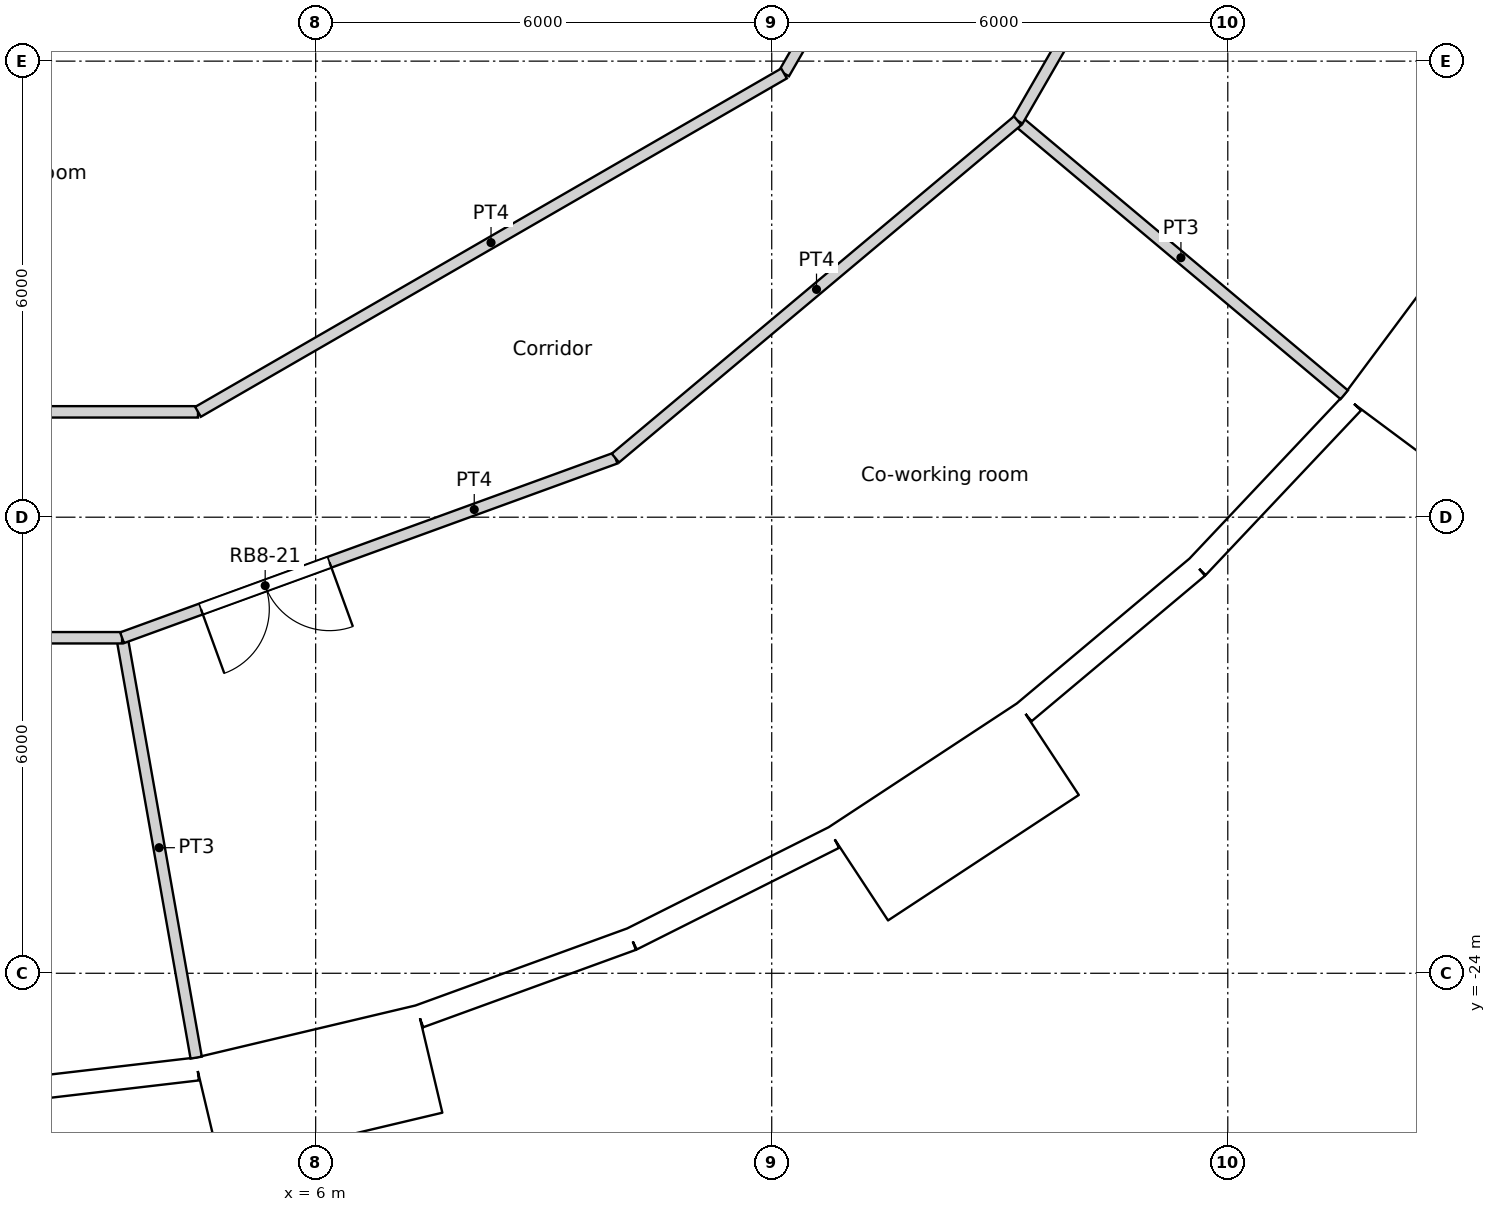
"""IFC4 building model, lengths in metres.
Left out: names, types, materials, properties, quantities, classifications, styles, units other than length and angle.
Written with IfcOpenShell. Run it as: python <this file> out.ifc"""

import sys

from ifc_helpers import new_model, si_unit, direction, frame, frame_2d, origin, origin_2d, place, context, subcontext, project, spatial, rectangle, circle, extrude, element, fill, save


model = new_model("IFC4")
c1 = context("Model", 3, precision=1e-05, world=origin(), true_north=direction((0.0, 1.0)))
c2 = subcontext(c1, "Body", "Model", "MODEL_VIEW")
j1 = project(units=[si_unit("LENGTHUNIT", "METRE"), si_unit("PLANEANGLEUNIT", "RADIAN")], contexts=[c1])
p1 = place(None, origin())
s1 = spatial("IfcSite", under=j1, at=p1, CompositionType="ELEMENT")
p2 = place(p1, origin())
s2 = spatial("IfcBuilding", under=s1, at=p2, CompositionType="ELEMENT")
p3 = place(p2, frame((0.0, 0.0, 201.6)))
s3 = spatial("IfcBuildingStorey", under=s2, at=p3, CompositionType="ELEMENT", Elevation=201.6)
for number, where, z_axis, x_axis in (
    (1, (4.263, -24.175, 0.0), (0.0, 0.0, 1.0), (1.0, 0.0, 0.0)),
    (2, (9.723, -22.54, 0.0), (0.0, 0.0, 1.0), (1.0, 0.0, 0.0)),
    (3, (14.659, -19.69, 0.0), (0.0, 0.0, 1.0), (1.0, 0.0, 0.0)),
    (4, (18.805, -15.779, 0.0), (0.0, 0.0, 1.0), (1.0, 0.0, 0.0)),
):
    element("IfcColumn", number, at=place(p3, frame(where, z_axis=z_axis, x_axis=x_axis)), inside=s3, PredefinedType="COLUMN", context=c2, shape_type="SweptSolid", body=[
        extrude(circle(Radius=0.6, at=origin_2d()), origin(), (0.0, 0.0, 1.0), 3.6),
    ])
for number, where, z_axis, x_axis in (
    (5, (6.876, -17.521, 0.0), (0.0, 0.0, 1.0), (1.0, 0.0, 0.0)),
    (6, (11.735, -14.716, 0.0), (0.0, 0.0, 1.0), (1.0, 0.0, 0.0)),
):
    element("IfcColumn", number, at=place(p3, frame(where, z_axis=z_axis, x_axis=x_axis)), inside=s3, PredefinedType="COLUMN", context=c2, shape_type="SweptSolid", body=[
        extrude(circle(Radius=0.65, at=origin_2d()), origin(), (0.0, 0.0, 1.0), 3.6),
    ])
p4 = place(p3, frame((1.491, -25.604, 0.0), z_axis=(0.0, 0.0, 1.0), x_axis=(0.993245010522, 0.1160359818, 0.0)))
e7 = element("IfcWall", 7, at=p4, inside=s3, PredefinedType="SOLIDWALL", context=c2, shape_type="SweptSolid", body=[
    extrude(rectangle(XDim=2.973, YDim=0.3, at=frame_2d((1.486, 0.0))), origin(), (0.0, 0.0, 1.0), 3.3),
])
p5 = place(p4, frame((1.486, 0.0, 1.55)))
e8 = element("IfcOpeningElement", 8, at=p5, cuts=e7, PredefinedType="OPENING", context=c2, shape_type="SweptSolid", body=[
    extrude(circle(Radius=0.9, at=origin_2d()), frame((0.0, 0.16, 0.0), z_axis=(0.0, -1.0, 0.0), x_axis=(1.0, 0.0, 0.0)), (0.0, 0.0, 1.0), 0.32),
])
p6 = place(p3, frame((4.578, -25.819, -0.3), z_axis=(0.0, 0.0, 1.0), x_axis=(0.973042333261, 0.23062657627, 0.0)))
e9 = element("IfcWall", 9, at=p6, inside=s3, PredefinedType="ELEMENTEDWALL", context=c2, shape_type="SweptSolid", body=[
    extrude(rectangle(XDim=3.0, YDim=1.45, at=frame_2d((1.5, 0.0))), origin(), (0.0, 0.0, 1.0), 3.6),
])
p7 = place(p6, frame((1.5, 0.0, 1.85)))
e10 = element("IfcOpeningElement", 10, at=p7, cuts=e9, PredefinedType="OPENING", context=c2, shape_type="SweptSolid", body=[
    extrude(circle(Radius=0.9, at=origin_2d()), frame((0.0, 0.735, 0.0), z_axis=(0.0, -1.0, 0.0), x_axis=(1.0, 0.0, 0.0)), (0.0, 0.0, 1.0), 1.47),
])
p8 = place(p3, frame((7.365, -24.567, 0.0), z_axis=(0.0, 0.0, 1.0), x_axis=(0.939690282133, 0.342026568652, 0.0)))
e11 = element("IfcWall", 11, at=p8, inside=s3, PredefinedType="SOLIDWALL", context=c2, shape_type="SweptSolid", body=[
    extrude(rectangle(XDim=2.973, YDim=0.3, at=frame_2d((1.486, 0.0))), origin(), (0.0, 0.0, 1.0), 3.3),
])
p9 = place(p8, frame((1.486, 0.0, 1.55)))
e12 = element("IfcOpeningElement", 12, at=p9, cuts=e11, PredefinedType="OPENING", context=c2, shape_type="SweptSolid", body=[
    extrude(circle(Radius=0.9, at=origin_2d()), frame((0.0, 0.16, 0.0), z_axis=(0.0, -1.0, 0.0), x_axis=(1.0, 0.0, 0.0)), (0.0, 0.0, 1.0), 0.32),
])
p10 = place(p3, frame((10.158, -23.55, 0.0), z_axis=(0.0, 0.0, 1.0), x_axis=(0.893637442555, 0.448789618045, 0.0)))
e13 = element("IfcWall", 13, at=p10, inside=s3, PredefinedType="SOLIDWALL", context=c2, shape_type="SweptSolid", body=[
    extrude(rectangle(XDim=2.973, YDim=0.3, at=frame_2d((1.486, 0.0))), origin(), (0.0, 0.0, 1.0), 3.3),
])
p11 = place(p10, frame((1.486, 0.0, 1.55)))
e14 = element("IfcOpeningElement", 14, at=p11, cuts=e13, PredefinedType="OPENING", context=c2, shape_type="SweptSolid", body=[
    extrude(circle(Radius=0.9, at=origin_2d()), frame((0.0, 0.16, 0.0), z_axis=(0.0, -1.0, 0.0), x_axis=(1.0, 0.0, 0.0)), (0.0, 0.0, 1.0), 0.32),
])
p12 = place(p3, frame((13.132, -22.697, -0.3), z_axis=(0.0, 0.0, 1.0), x_axis=(0.835514416706, 0.549468524554, 0.0)))
e15 = element("IfcWall", 15, at=p12, inside=s3, PredefinedType="ELEMENTEDWALL", context=c2, shape_type="SweptSolid", body=[
    extrude(rectangle(XDim=3.0, YDim=1.45, at=frame_2d((1.5, 0.0))), origin(), (0.0, 0.0, 1.0), 3.6),
])
p13 = place(p12, frame((1.5, 0.0, 1.85)))
e16 = element("IfcOpeningElement", 16, at=p13, cuts=e15, PredefinedType="OPENING", context=c2, shape_type="SweptSolid", body=[
    extrude(circle(Radius=0.9, at=origin_2d()), frame((0.0, 0.735, 0.0), z_axis=(0.0, -1.0, 0.0), x_axis=(1.0, 0.0, 0.0)), (0.0, 0.0, 1.0), 1.47),
])
p14 = place(p3, frame((15.323, -20.566, 0.0), z_axis=(0.0, 0.0, 1.0), x_axis=(0.766049350637, 0.642781761089, 0.0)))
e17 = element("IfcWall", 17, at=p14, inside=s3, PredefinedType="SOLIDWALL", context=c2, shape_type="SweptSolid", body=[
    extrude(rectangle(XDim=2.973, YDim=0.3, at=frame_2d((1.486, 0.0))), origin(), (0.0, 0.0, 1.0), 3.3),
])
p15 = place(p14, frame((1.486, 0.0, 1.55)))
e18 = element("IfcOpeningElement", 18, at=p15, cuts=e17, PredefinedType="OPENING", context=c2, shape_type="SweptSolid", body=[
    extrude(circle(Radius=0.9, at=origin_2d()), frame((0.0, 0.16, 0.0), z_axis=(0.0, -1.0, 0.0), x_axis=(1.0, 0.0, 0.0)), (0.0, 0.0, 1.0), 0.32),
])
p16 = place(p3, frame((17.6, -18.655, 0.0), z_axis=(0.0, 0.0, 1.0), x_axis=(0.686235184166, 0.727379730273, 0.0)))
e19 = element("IfcWall", 19, at=p16, inside=s3, PredefinedType="SOLIDWALL", context=c2, shape_type="SweptSolid", body=[
    extrude(rectangle(XDim=2.973, YDim=0.3, at=frame_2d((1.486, 0.0))), origin(), (0.0, 0.0, 1.0), 3.3),
])
p17 = place(p16, frame((1.486, 0.0, 1.55)))
e20 = element("IfcOpeningElement", 20, at=p17, cuts=e19, PredefinedType="OPENING", context=c2, shape_type="SweptSolid", body=[
    extrude(circle(Radius=0.9, at=origin_2d()), frame((0.0, 0.16, 0.0), z_axis=(0.0, -1.0, 0.0), x_axis=(1.0, 0.0, 0.0)), (0.0, 0.0, 1.0), 0.32),
])
p18 = place(p3, frame((20.103, -16.836, -0.3), z_axis=(0.0, 0.0, 1.0), x_axis=(0.597183717734, 0.802104486506, 0.0)))
e21 = element("IfcWall", 21, at=p18, inside=s3, PredefinedType="ELEMENTEDWALL", context=c2, shape_type="SweptSolid", body=[
    extrude(rectangle(XDim=3.0, YDim=1.45, at=frame_2d((1.5, 0.0))), origin(), (0.0, 0.0, 1.0), 3.6),
])
p19 = place(p18, frame((1.5, 0.0, 1.85)))
e22 = element("IfcOpeningElement", 22, at=p19, cuts=e21, PredefinedType="OPENING", context=c2, shape_type="SweptSolid", body=[
    extrude(circle(Radius=0.9, at=origin_2d()), frame((0.0, 0.735, 0.0), z_axis=(0.0, -1.0, 0.0), x_axis=(1.0, 0.0, 0.0)), (0.0, 0.0, 1.0), 1.47),
])
p20 = place(p3, frame((12.162, -12.162, 0.0), z_axis=(0.0, 0.0, 1.0), x_axis=(0.499961633463, 0.866047553582, 0.0)))
e23 = element("IfcWall", 23, at=p20, inside=s3, PredefinedType="PARTITIONING", context=c2, shape_type="SweptSolid", body=[
    extrude(rectangle(XDim=2.15, YDim=0.15, at=frame_2d((1.075, 0.0))), origin(), (0.0, 0.0, 1.0), 3.3),
])
p21 = place(p3, frame((9.943, -17.222, 0.0), z_axis=(0.0, 0.0, 1.0), x_axis=(0.766192104565, 0.642611592567, 0.0)))
e24 = element("IfcWall", 24, at=p21, inside=s3, PredefinedType="PARTITIONING", context=c2, shape_type="SweptSolid", body=[
    extrude(rectangle(XDim=6.906, YDim=0.15, at=frame_2d((3.453, 0.0))), origin(), (0.0, 0.0, 1.0), 3.3),
])
p22 = place(p3, frame((15.235, -12.784, 0.0), z_axis=(0.0, 0.0, 1.0), x_axis=(0.499914202267, 0.866074933462, 0.0)))
e25 = element("IfcWall", 25, at=p22, inside=s3, PredefinedType="PARTITIONING", context=c2, shape_type="SweptSolid", body=[
    extrude(rectangle(XDim=6.907, YDim=0.15, at=frame_2d((3.454, 0.0))), origin(), (0.0, 0.0, 1.0), 3.3),
])
p23 = place(p22, frame((3.003, 0.0, 0.0)))
e26 = element("IfcOpeningElement", 26, at=p23, cuts=e25, PredefinedType="OPENING", context=c2, shape_type="SweptSolid", body=[
    extrude(rectangle(XDim=1.8, YDim=2.1, at=frame_2d((0.9, 1.05))), frame((0.0, 0.075, 0.0), z_axis=(0.0, -1.0, 0.0), x_axis=(1.0, 0.0, 0.0)), (0.0, 0.0, 1.0), 0.15),
])
p24 = place(p3, frame((-3.021, -16.614, 0.0), z_axis=(0.0, 0.0, 1.0), x_axis=(1.0, 0.0, 0.0)))
e27 = element("IfcWall", 27, at=p24, inside=s3, PredefinedType="PARTITIONING", context=c2, shape_type="SweptSolid", body=[
    extrude(rectangle(XDim=7.473, YDim=0.15, at=frame_2d((3.736, 0.0))), origin(), (0.0, 0.0, 1.0), 3.3),
])
p25 = place(p3, frame((4.452, -16.614, 0.0), z_axis=(0.0, 0.0, 1.0), x_axis=(0.866005203721, 0.500034985904, 0.0)))
e28 = element("IfcWall", 28, at=p25, inside=s3, PredefinedType="PARTITIONING", context=c2, shape_type="SweptSolid", body=[
    extrude(rectangle(XDim=8.903, YDim=0.15, at=frame_2d((4.452, 0.0))), origin(), (0.0, 0.0, 1.0), 3.3),
])
p26 = place(p3, frame((-3.453, -19.586, 0.0), z_axis=(0.0, 0.0, 1.0), x_axis=(1.0, 0.0, 0.0)))
e29 = element("IfcWall", 29, at=p26, inside=s3, PredefinedType="PARTITIONING", context=c2, shape_type="SweptSolid", body=[
    extrude(rectangle(XDim=6.906, YDim=0.15, at=frame_2d((3.453, 0.0))), origin(), (0.0, 0.0, 1.0), 3.3),
])
p27 = place(p26, frame((2.903, 0.0, 0.0)))
e30 = element("IfcOpeningElement", 30, at=p27, cuts=e29, PredefinedType="OPENING", context=c2, shape_type="SweptSolid", body=[
    extrude(rectangle(XDim=1.0, YDim=2.04, at=frame_2d((0.5, 1.02))), frame((0.0, 0.075, 0.0), z_axis=(0.0, -1.0, 0.0), x_axis=(1.0, 0.0, 0.0)), (0.0, 0.0, 1.0), 0.15),
])
p28 = place(p3, frame((3.453, -19.586, 0.0), z_axis=(0.0, 0.0, 1.0), x_axis=(0.939672634566, 0.342075050021, 0.0)))
e31 = element("IfcWall", 31, at=p28, inside=s3, PredefinedType="PARTITIONING", context=c2, shape_type="SweptSolid", body=[
    extrude(rectangle(XDim=6.908, YDim=0.15, at=frame_2d((3.454, 0.0))), origin(), (0.0, 0.0, 1.0), 3.3),
])
p29 = place(p28, frame((1.104, 0.0, 0.0)))
e32 = element("IfcOpeningElement", 32, at=p29, cuts=e31, PredefinedType="OPENING", context=c2, shape_type="SweptSolid", body=[
    extrude(rectangle(XDim=1.8, YDim=2.1, at=frame_2d((0.9, 1.05))), frame((0.0, 0.075, 0.0), z_axis=(0.0, -1.0, 0.0), x_axis=(1.0, 0.0, 0.0)), (0.0, 0.0, 1.0), 0.15),
])
p30 = place(p3, frame((3.453, -19.586, 0.0), z_axis=(0.0, 0.0, 1.0), x_axis=(0.17382754149, -0.984776109489, 0.0)))
e33 = element("IfcWall", 33, at=p30, inside=s3, PredefinedType="PARTITIONING", context=c2, shape_type="SweptSolid", body=[
    extrude(rectangle(XDim=5.61, YDim=0.15, at=frame_2d((2.805, 0.0))), origin(), (0.0, 0.0, 1.0), 3.3),
])
p31 = place(p3, frame((15.235, -12.784, 0.0), z_axis=(0.0, 0.0, 1.0), x_axis=(0.76609059793, -0.642732600514, 0.0)))
e34 = element("IfcWall", 34, at=p31, inside=s3, PredefinedType="PARTITIONING", context=c2, shape_type="SweptSolid", body=[
    extrude(rectangle(XDim=5.609, YDim=0.15, at=frame_2d((2.804, 0.0))), origin(), (0.0, 0.0, 1.0), 3.3),
])
p32 = place(p5, origin())
e35 = element("IfcWindow", 35, at=p32, inside=s3, PartitioningType="SINGLE_PANEL", PredefinedType="WINDOW", context=c2, shape_type="SweptSolid", body=[
    extrude(circle(Radius=0.9, at=origin_2d()), frame((0.0, 0.12, 0.0), z_axis=(0.0, -1.0, 0.0), x_axis=(1.0, 0.0, 0.0)), (0.0, 0.0, 1.0), 0.1),
])
fill(e8, e35)
p33 = place(p7, origin())
e36 = element("IfcWindow", 36, at=p33, inside=s3, PartitioningType="SINGLE_PANEL", PredefinedType="WINDOW", context=c2, shape_type="SweptSolid", body=[
    extrude(circle(Radius=0.9, at=origin_2d()), frame((0.0, 0.695, 0.0), z_axis=(0.0, -1.0, 0.0), x_axis=(1.0, 0.0, 0.0)), (0.0, 0.0, 1.0), 0.1),
])
fill(e10, e36)
p34 = place(p9, origin())
e37 = element("IfcWindow", 37, at=p34, inside=s3, PartitioningType="SINGLE_PANEL", PredefinedType="WINDOW", context=c2, shape_type="SweptSolid", body=[
    extrude(circle(Radius=0.9, at=origin_2d()), frame((0.0, 0.12, 0.0), z_axis=(0.0, -1.0, 0.0), x_axis=(1.0, 0.0, 0.0)), (0.0, 0.0, 1.0), 0.1),
])
fill(e12, e37)
p35 = place(p11, origin())
e38 = element("IfcWindow", 38, at=p35, inside=s3, PartitioningType="SINGLE_PANEL", PredefinedType="WINDOW", context=c2, shape_type="SweptSolid", body=[
    extrude(circle(Radius=0.9, at=origin_2d()), frame((0.0, 0.12, 0.0), z_axis=(0.0, -1.0, 0.0), x_axis=(1.0, 0.0, 0.0)), (0.0, 0.0, 1.0), 0.1),
])
fill(e14, e38)
p36 = place(p13, origin())
e39 = element("IfcWindow", 39, at=p36, inside=s3, PartitioningType="SINGLE_PANEL", PredefinedType="WINDOW", context=c2, shape_type="SweptSolid", body=[
    extrude(circle(Radius=0.9, at=origin_2d()), frame((0.0, 0.695, 0.0), z_axis=(0.0, -1.0, 0.0), x_axis=(1.0, 0.0, 0.0)), (0.0, 0.0, 1.0), 0.1),
])
fill(e16, e39)
p37 = place(p15, origin())
e40 = element("IfcWindow", 40, at=p37, inside=s3, PartitioningType="SINGLE_PANEL", PredefinedType="WINDOW", context=c2, shape_type="SweptSolid", body=[
    extrude(circle(Radius=0.9, at=origin_2d()), frame((0.0, 0.12, 0.0), z_axis=(0.0, -1.0, 0.0), x_axis=(1.0, 0.0, 0.0)), (0.0, 0.0, 1.0), 0.1),
])
fill(e18, e40)
p38 = place(p17, origin())
e41 = element("IfcWindow", 41, at=p38, inside=s3, PartitioningType="SINGLE_PANEL", PredefinedType="WINDOW", context=c2, shape_type="SweptSolid", body=[
    extrude(circle(Radius=0.9, at=origin_2d()), frame((0.0, 0.12, 0.0), z_axis=(0.0, -1.0, 0.0), x_axis=(1.0, 0.0, 0.0)), (0.0, 0.0, 1.0), 0.1),
])
fill(e20, e41)
p39 = place(p19, origin())
e42 = element("IfcWindow", 42, at=p39, inside=s3, PartitioningType="SINGLE_PANEL", PredefinedType="WINDOW", context=c2, shape_type="SweptSolid", body=[
    extrude(circle(Radius=0.9, at=origin_2d()), frame((0.0, 0.695, 0.0), z_axis=(0.0, -1.0, 0.0), x_axis=(1.0, 0.0, 0.0)), (0.0, 0.0, 1.0), 0.1),
])
fill(e22, e42)
p40 = place(p29, origin())
e43 = element("IfcDoor", 43, at=p40, inside=s3, OperationType="DOUBLE_DOOR_SINGLE_SWING", PredefinedType="DOOR", context=c2, shape_type="SweptSolid", body=[
    extrude(rectangle(XDim=1.8, YDim=2.1, at=frame_2d((0.9, 1.05))), frame((0.0, 0.025, 0.0), z_axis=(0.0, -1.0, 0.0), x_axis=(1.0, 0.0, 0.0)), (0.0, 0.0, 1.0), 0.05),
])
fill(e32, e43)
save(model, sys.argv[1])
